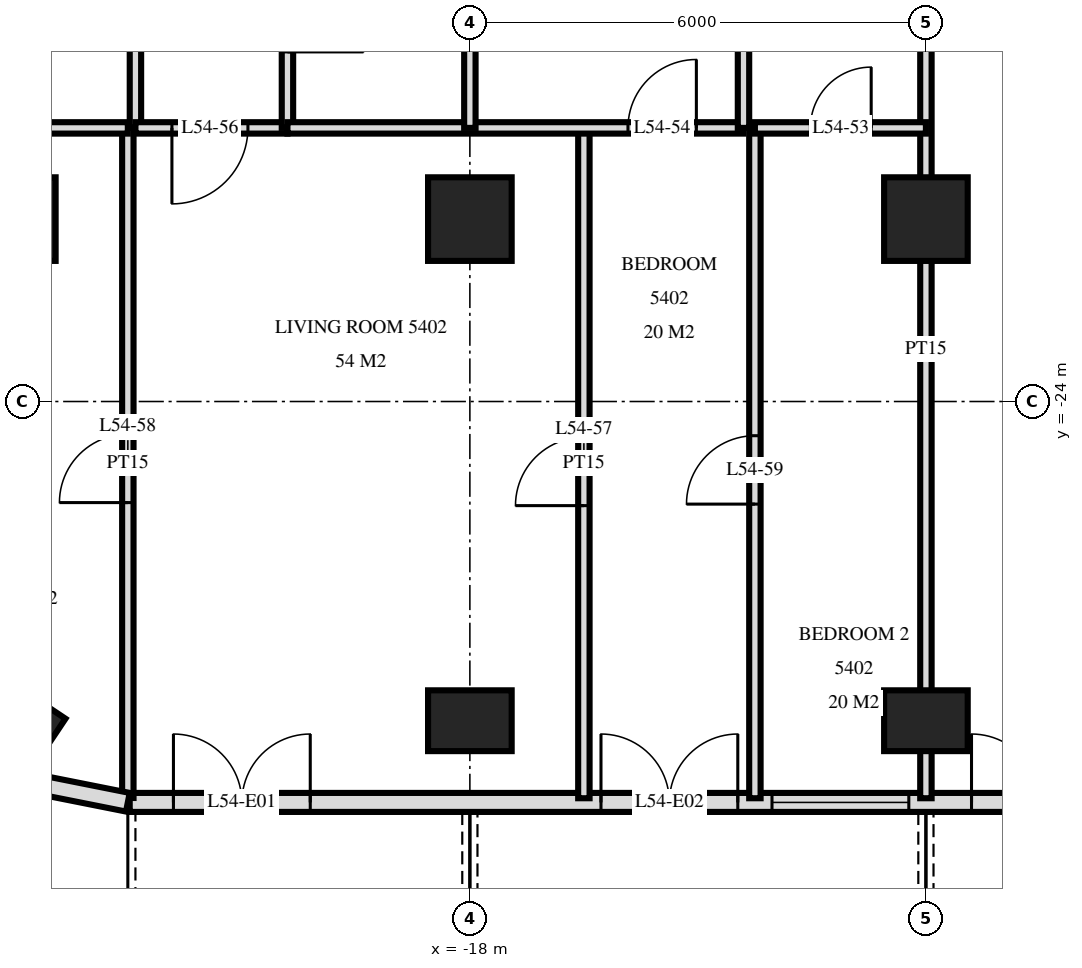
"""IFC4 building model, lengths in metres.
Left out: names, types, materials, properties, quantities, classifications, styles, units other than length and angle.
Written with IfcOpenShell. Run it as: python <this file> out.ifc"""

import sys

from ifc_helpers import new_model, si_unit, direction, frame, frame_2d, origin, origin_2d, place, context, subcontext, project, spatial, rectangle, extrude, element, fill, save


model = new_model("IFC4")
c1 = context("Model", 3, precision=1e-05, world=origin(), true_north=direction((0.0, 1.0)))
c2 = subcontext(c1, "Body", "Model", "MODEL_VIEW")
j1 = project(units=[si_unit("LENGTHUNIT", "METRE"), si_unit("PLANEANGLEUNIT", "RADIAN")], contexts=[c1])
p1 = place(None, origin())
s1 = spatial("IfcSite", under=j1, at=p1, CompositionType="ELEMENT")
p2 = place(p1, origin())
s2 = spatial("IfcBuilding", under=s1, at=p2, CompositionType="ELEMENT")
p3 = place(p2, frame((0.0, 0.0, 208.1)))
s3 = spatial("IfcBuildingStorey", under=s2, at=p3, CompositionType="ELEMENT", Elevation=208.1)
p4 = place(p3, frame((-24.0, -28.2, 0.0), z_axis=(0.0, 0.0, 1.0), x_axis=(-0.831459915646, 0.555584744817, 0.0)))
e1 = element("IfcColumn", 1, at=p4, inside=s3, PredefinedType="COLUMN", context=c2, shape_type="SweptSolid", body=[
    extrude(rectangle(XDim=1.1, YDim=0.8, at=origin_2d()), origin(), (0.0, 0.0, 1.0), 3.5),
])
p5 = place(p3, frame((-24.0, -21.6, 0.0), z_axis=(0.0, 0.0, 1.0), x_axis=(1.0, 0.0, 0.0)))
e2 = element("IfcColumn", 2, at=p5, inside=s3, PredefinedType="COLUMN", context=c2, shape_type="SweptSolid", body=[
    extrude(rectangle(XDim=1.1, YDim=1.1, at=origin_2d()), origin(), (0.0, 0.0, 1.0), 3.5),
])
p6 = place(p3, frame((-18.0, -28.2, 0.0), z_axis=(0.0, 0.0, 1.0), x_axis=(1.0, 0.0, 0.0)))
e3 = element("IfcColumn", 3, at=p6, inside=s3, PredefinedType="COLUMN", context=c2, shape_type="SweptSolid", body=[
    extrude(rectangle(XDim=1.1, YDim=0.8, at=origin_2d()), origin(), (0.0, 0.0, 1.0), 3.5),
])
p7 = place(p3, frame((-18.0, -21.6, 0.0), z_axis=(0.0, 0.0, 1.0), x_axis=(1.0, 0.0, 0.0)))
e4 = element("IfcColumn", 4, at=p7, inside=s3, PredefinedType="COLUMN", context=c2, shape_type="SweptSolid", body=[
    extrude(rectangle(XDim=1.1, YDim=1.1, at=origin_2d()), origin(), (0.0, 0.0, 1.0), 3.5),
])
p8 = place(p3, frame((-12.0, -28.2, 0.0), z_axis=(0.0, 0.0, 1.0), x_axis=(1.0, 0.0, 0.0)))
e5 = element("IfcColumn", 5, at=p8, inside=s3, PredefinedType="COLUMN", context=c2, shape_type="SweptSolid", body=[
    extrude(rectangle(XDim=1.1, YDim=0.8, at=origin_2d()), origin(), (0.0, 0.0, 1.0), 3.5),
])
p9 = place(p3, frame((-12.0, -21.6, 0.0), z_axis=(0.0, 0.0, 1.0), x_axis=(1.0, 0.0, 0.0)))
e6 = element("IfcColumn", 6, at=p9, inside=s3, PredefinedType="COLUMN", context=c2, shape_type="SweptSolid", body=[
    extrude(rectangle(XDim=1.1, YDim=1.1, at=origin_2d()), origin(), (0.0, 0.0, 1.0), 3.5),
])
p10 = place(p3, frame((-24.149, -28.945, 0.0), z_axis=(0.0, 0.0, 1.0), x_axis=(0.980775640221, -0.19513878023, 0.0)))
e7 = element("IfcWall", 7, at=p10, inside=s3, PredefinedType="SOLIDWALL", context=c2, shape_type="SweptSolid", body=[
    extrude(rectangle(XDim=1.681, YDim=0.25, at=frame_2d((0.841, 0.0))), origin(), (0.0, 0.0, 1.0), 3.22),
])
p11 = place(p3, frame((-22.475, -29.275, 0.0), z_axis=(0.0, 0.0, 1.0), x_axis=(1.0, 0.0, 0.0)))
e8 = element("IfcWall", 8, at=p11, inside=s3, PredefinedType="SOLIDWALL", context=c2, shape_type="SweptSolid", body=[
    extrude(rectangle(XDim=44.951, YDim=0.25, at=frame_2d((22.475, 0.0))), origin(), (0.0, 0.0, 1.0), 3.22),
])
p12 = place(p11, frame((0.575, 0.0, 0.0)))
e9 = element("IfcOpeningElement", 9, at=p12, cuts=e8, PredefinedType="OPENING", context=c2, shape_type="SweptSolid", body=[
    extrude(rectangle(XDim=1.8, YDim=2.4, at=frame_2d((0.9, 1.2))), frame((0.0, 0.135, 0.0), z_axis=(0.0, -1.0, 0.0), x_axis=(1.0, 0.0, 0.0)), (0.0, 0.0, 1.0), 0.27),
])
p13 = place(p11, frame((6.2, 0.0, 0.0)))
e10 = element("IfcOpeningElement", 10, at=p13, cuts=e8, PredefinedType="OPENING", context=c2, shape_type="SweptSolid", body=[
    extrude(rectangle(XDim=1.8, YDim=2.4, at=frame_2d((0.9, 1.2))), frame((0.0, 0.135, 0.0), z_axis=(0.0, -1.0, 0.0), x_axis=(1.0, 0.0, 0.0)), (0.0, 0.0, 1.0), 0.27),
])
p14 = place(p11, frame((8.45, 0.0, 0.9)))
e11 = element("IfcOpeningElement", 11, at=p14, cuts=e8, PredefinedType="OPENING", context=c2, shape_type="SweptSolid", body=[
    extrude(rectangle(XDim=1.8, YDim=1.5, at=frame_2d((0.9, 0.75))), frame((0.0, 0.135, 0.0), z_axis=(0.0, -1.0, 0.0), x_axis=(1.0, 0.0, 0.0)), (0.0, 0.0, 1.0), 0.27),
])
p15 = place(p11, frame((11.075, 0.0, 0.0)))
e12 = element("IfcOpeningElement", 12, at=p15, cuts=e8, PredefinedType="OPENING", context=c2, shape_type="SweptSolid", body=[
    extrude(rectangle(XDim=1.8, YDim=2.4, at=frame_2d((0.9, 1.2))), frame((0.0, 0.135, 0.0), z_axis=(0.0, -1.0, 0.0), x_axis=(1.0, 0.0, 0.0)), (0.0, 0.0, 1.0), 0.27),
])
p16 = place(p11, frame((13.775, 0.0, 0.9)))
e13 = element("IfcOpeningElement", 13, at=p16, cuts=e8, PredefinedType="OPENING", context=c2, shape_type="SweptSolid", body=[
    extrude(rectangle(XDim=2.4, YDim=1.5, at=frame_2d((1.2, 0.75))), frame((0.0, 0.135, 0.0), z_axis=(0.0, -1.0, 0.0), x_axis=(1.0, 0.0, 0.0)), (0.0, 0.0, 1.0), 0.27),
])
p17 = place(p11, frame((16.775, 0.0, 0.9)))
e14 = element("IfcOpeningElement", 14, at=p17, cuts=e8, PredefinedType="OPENING", context=c2, shape_type="SweptSolid", body=[
    extrude(rectangle(XDim=2.4, YDim=1.5, at=frame_2d((1.2, 0.75))), frame((0.0, 0.135, 0.0), z_axis=(0.0, -1.0, 0.0), x_axis=(1.0, 0.0, 0.0)), (0.0, 0.0, 1.0), 0.27),
])
p18 = place(p11, frame((20.075, 0.0, 0.0)))
e15 = element("IfcOpeningElement", 15, at=p18, cuts=e8, PredefinedType="OPENING", context=c2, shape_type="SweptSolid", body=[
    extrude(rectangle(XDim=1.8, YDim=2.4, at=frame_2d((0.9, 1.2))), frame((0.0, 0.135, 0.0), z_axis=(0.0, -1.0, 0.0), x_axis=(1.0, 0.0, 0.0)), (0.0, 0.0, 1.0), 0.27),
])
p19 = place(p11, frame((23.075, 0.0, 0.0)))
e16 = element("IfcOpeningElement", 16, at=p19, cuts=e8, PredefinedType="OPENING", context=c2, shape_type="SweptSolid", body=[
    extrude(rectangle(XDim=1.8, YDim=2.4, at=frame_2d((0.9, 1.2))), frame((0.0, 0.135, 0.0), z_axis=(0.0, -1.0, 0.0), x_axis=(1.0, 0.0, 0.0)), (0.0, 0.0, 1.0), 0.27),
])
p20 = place(p11, frame((25.775, 0.0, 0.9)))
e17 = element("IfcOpeningElement", 17, at=p20, cuts=e8, PredefinedType="OPENING", context=c2, shape_type="SweptSolid", body=[
    extrude(rectangle(XDim=2.4, YDim=1.5, at=frame_2d((1.2, 0.75))), frame((0.0, 0.135, 0.0), z_axis=(0.0, -1.0, 0.0), x_axis=(1.0, 0.0, 0.0)), (0.0, 0.0, 1.0), 0.27),
])
p21 = place(p11, frame((29.075, 0.0, 0.0)))
e18 = element("IfcOpeningElement", 18, at=p21, cuts=e8, PredefinedType="OPENING", context=c2, shape_type="SweptSolid", body=[
    extrude(rectangle(XDim=1.8, YDim=2.4, at=frame_2d((0.9, 1.2))), frame((0.0, 0.135, 0.0), z_axis=(0.0, -1.0, 0.0), x_axis=(1.0, 0.0, 0.0)), (0.0, 0.0, 1.0), 0.27),
])
p22 = place(p11, frame((31.775, 0.0, 0.9)))
e19 = element("IfcOpeningElement", 19, at=p22, cuts=e8, PredefinedType="OPENING", context=c2, shape_type="SweptSolid", body=[
    extrude(rectangle(XDim=2.4, YDim=1.5, at=frame_2d((1.2, 0.75))), frame((0.0, 0.135, 0.0), z_axis=(0.0, -1.0, 0.0), x_axis=(1.0, 0.0, 0.0)), (0.0, 0.0, 1.0), 0.27),
])
p23 = place(p11, frame((34.775, 0.0, 0.9)))
e20 = element("IfcOpeningElement", 20, at=p23, cuts=e8, PredefinedType="OPENING", context=c2, shape_type="SweptSolid", body=[
    extrude(rectangle(XDim=2.4, YDim=1.5, at=frame_2d((1.2, 0.75))), frame((0.0, 0.135, 0.0), z_axis=(0.0, -1.0, 0.0), x_axis=(1.0, 0.0, 0.0)), (0.0, 0.0, 1.0), 0.27),
])
p24 = place(p11, frame((38.075, 0.0, 0.0)))
e21 = element("IfcOpeningElement", 21, at=p24, cuts=e8, PredefinedType="OPENING", context=c2, shape_type="SweptSolid", body=[
    extrude(rectangle(XDim=1.8, YDim=2.4, at=frame_2d((0.9, 1.2))), frame((0.0, 0.135, 0.0), z_axis=(0.0, -1.0, 0.0), x_axis=(1.0, 0.0, 0.0)), (0.0, 0.0, 1.0), 0.27),
])
p25 = place(p11, frame((41.075, 0.0, 0.0)))
e22 = element("IfcOpeningElement", 22, at=p25, cuts=e8, PredefinedType="OPENING", context=c2, shape_type="SweptSolid", body=[
    extrude(rectangle(XDim=1.8, YDim=2.4, at=frame_2d((0.9, 1.2))), frame((0.0, 0.135, 0.0), z_axis=(0.0, -1.0, 0.0), x_axis=(1.0, 0.0, 0.0)), (0.0, 0.0, 1.0), 0.27),
])
p26 = place(p3, frame((-12.0, -29.22, 0.0), z_axis=(0.0, 0.0, 1.0), x_axis=(0.0, 1.0, 0.0)))
e23 = element("IfcWall", 23, at=p26, inside=s3, PredefinedType="PARTITIONING", context=c2, shape_type="SweptSolid", body=[
    extrude(rectangle(XDim=11.82, YDim=0.15, at=frame_2d((5.91, 0.0))), origin(), (0.0, 0.0, 1.0), 3.22),
])
p27 = place(p3, frame((-14.25, -29.22, 0.0), z_axis=(0.0, 0.0, 1.0), x_axis=(0.0, 1.0, 0.0)))
e24 = element("IfcWall", 24, at=p27, inside=s3, PredefinedType="PARTITIONING", context=c2, shape_type="SweptSolid", body=[
    extrude(rectangle(XDim=8.82, YDim=0.15, at=frame_2d((4.41, 0.0))), origin(), (0.0, 0.0, 1.0), 3.22),
])
p28 = place(p27, frame((3.87, 0.0, 0.0)))
e25 = element("IfcOpeningElement", 25, at=p28, cuts=e24, PredefinedType="OPENING", context=c2, shape_type="SweptSolid", body=[
    extrude(rectangle(XDim=0.9, YDim=2.1, at=frame_2d((0.45, 1.05))), frame((0.0, 0.085, 0.0), z_axis=(0.0, -1.0, 0.0), x_axis=(1.0, 0.0, 0.0)), (0.0, 0.0, 1.0), 0.17),
])
p29 = place(p3, frame((-14.4, -20.4, 0.0), z_axis=(0.0, 0.0, 1.0), x_axis=(0.0, 1.0, 0.0)))
e26 = element("IfcWall", 26, at=p29, inside=s3, PredefinedType="PARTITIONING", context=c2, shape_type="SweptSolid", body=[
    extrude(rectangle(XDim=3.0, YDim=0.15, at=frame_2d((1.5, 0.0))), origin(), (0.0, 0.0, 1.0), 3.22),
])
p30 = place(p3, frame((-16.5, -29.22, 0.0), z_axis=(0.0, 0.0, 1.0), x_axis=(0.0, 1.0, 0.0)))
e27 = element("IfcWall", 27, at=p30, inside=s3, PredefinedType="PARTITIONING", context=c2, shape_type="SweptSolid", body=[
    extrude(rectangle(XDim=8.82, YDim=0.15, at=frame_2d((4.41, 0.0))), origin(), (0.0, 0.0, 1.0), 3.22),
])
p31 = place(p30, frame((3.85, 0.0, 0.0)))
e28 = element("IfcOpeningElement", 28, at=p31, cuts=e27, PredefinedType="OPENING", context=c2, shape_type="SweptSolid", body=[
    extrude(rectangle(XDim=0.9, YDim=2.1, at=frame_2d((0.45, 1.05))), frame((0.0, 0.085, 0.0), z_axis=(0.0, -1.0, 0.0), x_axis=(1.0, 0.0, 0.0)), (0.0, 0.0, 1.0), 0.17),
])
p32 = place(p3, frame((-18.0, -20.4, 0.0), z_axis=(0.0, 0.0, 1.0), x_axis=(0.0, 1.0, 0.0)))
e29 = element("IfcWall", 29, at=p32, inside=s3, PredefinedType="PARTITIONING", context=c2, shape_type="SweptSolid", body=[
    extrude(rectangle(XDim=3.0, YDim=0.15, at=frame_2d((1.5, 0.0))), origin(), (0.0, 0.0, 1.0), 3.22),
])
p33 = place(p3, frame((-20.4, -20.4, 0.0), z_axis=(0.0, 0.0, 1.0), x_axis=(0.0, 1.0, 0.0)))
e30 = element("IfcWall", 30, at=p33, inside=s3, PredefinedType="PARTITIONING", context=c2, shape_type="SweptSolid", body=[
    extrude(rectangle(XDim=3.0, YDim=0.15, at=frame_2d((1.5, 0.0))), origin(), (0.0, 0.0, 1.0), 3.22),
])
p34 = place(p33, frame((1.0, 0.0, 0.0)))
e31 = element("IfcOpeningElement", 31, at=p34, cuts=e30, PredefinedType="OPENING", context=c2, shape_type="SweptSolid", body=[
    extrude(rectangle(XDim=1.0, YDim=2.1, at=frame_2d((0.5, 1.05))), frame((0.0, 0.085, 0.0), z_axis=(0.0, -1.0, 0.0), x_axis=(1.0, 0.0, 0.0)), (0.0, 0.0, 1.0), 0.17),
])
p35 = place(p3, frame((-22.4, -20.4, 0.0), z_axis=(0.0, 0.0, 1.0), x_axis=(0.0, 1.0, 0.0)))
e32 = element("IfcWall", 32, at=p35, inside=s3, PredefinedType="PARTITIONING", context=c2, shape_type="SweptSolid", body=[
    extrude(rectangle(XDim=3.0, YDim=0.15, at=frame_2d((1.5, 0.0))), origin(), (0.0, 0.0, 1.0), 3.22),
])
p36 = place(p3, frame((-22.5, -29.217, 0.0), z_axis=(0.0, 0.0, 1.0), x_axis=(0.0, 1.0, 0.0)))
e33 = element("IfcWall", 33, at=p36, inside=s3, PredefinedType="PARTITIONING", context=c2, shape_type="SweptSolid", body=[
    extrude(rectangle(XDim=8.817, YDim=0.15, at=frame_2d((4.408, 0.0))), origin(), (0.0, 0.0, 1.0), 3.22),
])
p37 = place(p36, frame((3.886, 0.0, 0.0)))
e34 = element("IfcOpeningElement", 34, at=p37, cuts=e33, PredefinedType="OPENING", context=c2, shape_type="SweptSolid", body=[
    extrude(rectangle(XDim=0.9, YDim=2.1, at=frame_2d((0.45, 1.05))), frame((0.0, 0.085, 0.0), z_axis=(0.0, -1.0, 0.0), x_axis=(1.0, 0.0, 0.0)), (0.0, 0.0, 1.0), 0.17),
])
p38 = place(p3, frame((-22.4, -20.4, 0.0), z_axis=(0.0, 0.0, 1.0), x_axis=(1.0, 0.0, 0.0)))
e35 = element("IfcWall", 35, at=p38, inside=s3, PredefinedType="PARTITIONING", context=c2, shape_type="SweptSolid", body=[
    extrude(rectangle(XDim=2.0, YDim=0.15, at=frame_2d((1.0, 0.0))), origin(), (0.0, 0.0, 1.0), 3.22),
])
p39 = place(p38, frame((0.48, 0.0, 0.0)))
e36 = element("IfcOpeningElement", 36, at=p39, cuts=e35, PredefinedType="OPENING", context=c2, shape_type="SweptSolid", body=[
    extrude(rectangle(XDim=1.0, YDim=2.1, at=frame_2d((0.5, 1.05))), frame((0.0, 0.085, 0.0), z_axis=(0.0, -1.0, 0.0), x_axis=(1.0, 0.0, 0.0)), (0.0, 0.0, 1.0), 0.17),
])
p40 = place(p3, frame((-26.82, -20.4, 0.0), z_axis=(0.0, 0.0, 1.0), x_axis=(1.0, 0.0, 0.0)))
e37 = element("IfcWall", 37, at=p40, inside=s3, PredefinedType="PARTITIONING", context=c2, shape_type="SweptSolid", body=[
    extrude(rectangle(XDim=4.32, YDim=0.15, at=frame_2d((2.16, 0.0))), origin(), (0.0, 0.0, 1.0), 3.22),
])
p41 = place(p3, frame((-20.4, -20.4, 0.0), z_axis=(0.0, 0.0, 1.0), x_axis=(1.0, 0.0, 0.0)))
e38 = element("IfcWall", 38, at=p41, inside=s3, PredefinedType="PARTITIONING", context=c2, shape_type="SweptSolid", body=[
    extrude(rectangle(XDim=6.0, YDim=0.15, at=frame_2d((3.0, 0.0))), origin(), (0.0, 0.0, 1.0), 3.22),
])
p42 = place(p41, frame((4.48, 0.0, 0.0)))
e39 = element("IfcOpeningElement", 39, at=p42, cuts=e38, PredefinedType="OPENING", context=c2, shape_type="SweptSolid", body=[
    extrude(rectangle(XDim=0.9, YDim=2.1, at=frame_2d((0.45, 1.05))), frame((0.0, 0.085, 0.0), z_axis=(0.0, -1.0, 0.0), x_axis=(1.0, 0.0, 0.0)), (0.0, 0.0, 1.0), 0.17),
])
p43 = place(p3, frame((-14.25, -20.4, 0.0), z_axis=(0.0, 0.0, 1.0), x_axis=(1.0, 0.0, 0.0)))
e40 = element("IfcWall", 40, at=p43, inside=s3, PredefinedType="PARTITIONING", context=c2, shape_type="SweptSolid", body=[
    extrude(rectangle(XDim=2.25, YDim=0.15, at=frame_2d((1.125, 0.0))), origin(), (0.0, 0.0, 1.0), 3.22),
])
p44 = place(p43, frame((0.73, 0.0, 0.0)))
e41 = element("IfcOpeningElement", 41, at=p44, cuts=e40, PredefinedType="OPENING", context=c2, shape_type="SweptSolid", body=[
    extrude(rectangle(XDim=0.8, YDim=2.1, at=frame_2d((0.4, 1.05))), frame((0.0, 0.085, 0.0), z_axis=(0.0, -1.0, 0.0), x_axis=(1.0, 0.0, 0.0)), (0.0, 0.0, 1.0), 0.17),
])
p45 = place(p12, origin())
e42 = element("IfcDoor", 42, at=p45, inside=s3, OperationType="DOUBLE_DOOR_SINGLE_SWING", PredefinedType="DOOR", context=c2, shape_type="SweptSolid", body=[
    extrude(rectangle(XDim=1.8, YDim=2.4, at=frame_2d((0.9, 1.2))), frame((0.0, 0.025, 0.0), z_axis=(0.0, -1.0, 0.0), x_axis=(1.0, 0.0, 0.0)), (0.0, 0.0, 1.0), 0.05),
])
fill(e9, e42)
p46 = place(p13, origin())
e43 = element("IfcDoor", 43, at=p46, inside=s3, OperationType="DOUBLE_DOOR_SINGLE_SWING", PredefinedType="DOOR", context=c2, shape_type="SweptSolid", body=[
    extrude(rectangle(XDim=1.8, YDim=2.4, at=frame_2d((0.9, 1.2))), frame((0.0, 0.025, 0.0), z_axis=(0.0, -1.0, 0.0), x_axis=(1.0, 0.0, 0.0)), (0.0, 0.0, 1.0), 0.05),
])
fill(e10, e43)
p47 = place(p14, origin())
e44 = element("IfcWindow", 44, at=p47, inside=s3, PartitioningType="SINGLE_PANEL", PredefinedType="WINDOW", context=c2, shape_type="SweptSolid", body=[
    extrude(rectangle(XDim=1.8, YDim=1.5, at=frame_2d((0.9, 0.75))), frame((0.0, 0.03, 0.0), z_axis=(0.0, -1.0, 0.0), x_axis=(1.0, 0.0, 0.0)), (0.0, 0.0, 1.0), 0.06),
])
fill(e11, e44)
p48 = place(p15, origin())
e45 = element("IfcDoor", 45, at=p48, inside=s3, OperationType="DOUBLE_DOOR_SINGLE_SWING", PredefinedType="DOOR", context=c2, shape_type="SweptSolid", body=[
    extrude(rectangle(XDim=1.8, YDim=2.4, at=frame_2d((0.9, 1.2))), frame((0.0, 0.025, 0.0), z_axis=(0.0, -1.0, 0.0), x_axis=(1.0, 0.0, 0.0)), (0.0, 0.0, 1.0), 0.05),
])
fill(e12, e45)
p49 = place(p44, origin())
e46 = element("IfcDoor", 46, at=p49, inside=s3, OperationType="SINGLE_SWING_LEFT", PredefinedType="DOOR", context=c2, shape_type="SweptSolid", body=[
    extrude(rectangle(XDim=0.8, YDim=2.1, at=frame_2d((0.4, 1.05))), frame((0.0, 0.025, 0.0), z_axis=(0.0, -1.0, 0.0), x_axis=(1.0, 0.0, 0.0)), (0.0, 0.0, 1.0), 0.05),
])
fill(e41, e46)
p50 = place(p42, origin())
e47 = element("IfcDoor", 47, at=p50, inside=s3, OperationType="SINGLE_SWING_LEFT", PredefinedType="DOOR", context=c2, shape_type="SweptSolid", body=[
    extrude(rectangle(XDim=0.9, YDim=2.1, at=frame_2d((0.45, 1.05))), frame((0.0, 0.025, 0.0), z_axis=(0.0, -1.0, 0.0), x_axis=(1.0, 0.0, 0.0)), (0.0, 0.0, 1.0), 0.05),
])
fill(e39, e47)
p51 = place(p39, frame((0.5, 0.0, 0.0), z_axis=(0.0, 0.0, 1.0), x_axis=(-1.0, 0.0, 0.0)))
e48 = element("IfcDoor", 48, at=p51, inside=s3, OperationType="SINGLE_SWING_LEFT", PredefinedType="DOOR", context=c2, shape_type="SweptSolid", body=[
    extrude(rectangle(XDim=1.0, YDim=2.1, at=frame_2d((0.0, 1.05))), frame((0.0, -0.025, 0.0), z_axis=(0.0, 1.0, 0.0), x_axis=(-1.0, 0.0, 0.0)), (0.0, 0.0, 1.0), 0.05),
])
fill(e36, e48)
p52 = place(p31, origin())
e49 = element("IfcDoor", 49, at=p52, inside=s3, OperationType="SINGLE_SWING_RIGHT", PredefinedType="DOOR", context=c2, shape_type="SweptSolid", body=[
    extrude(rectangle(XDim=0.9, YDim=2.1, at=frame_2d((0.45, 1.05))), frame((0.0, 0.025, 0.0), z_axis=(0.0, -1.0, 0.0), x_axis=(1.0, 0.0, 0.0)), (0.0, 0.0, 1.0), 0.05),
])
fill(e28, e49)
p53 = place(p37, origin())
e50 = element("IfcDoor", 50, at=p53, inside=s3, OperationType="SINGLE_SWING_RIGHT", PredefinedType="DOOR", context=c2, shape_type="SweptSolid", body=[
    extrude(rectangle(XDim=0.9, YDim=2.1, at=frame_2d((0.45, 1.05))), frame((0.0, 0.025, 0.0), z_axis=(0.0, -1.0, 0.0), x_axis=(1.0, 0.0, 0.0)), (0.0, 0.0, 1.0), 0.05),
])
fill(e34, e50)
p54 = place(p28, origin())
e51 = element("IfcDoor", 51, at=p54, inside=s3, OperationType="SINGLE_SWING_RIGHT", PredefinedType="DOOR", context=c2, shape_type="SweptSolid", body=[
    extrude(rectangle(XDim=0.9, YDim=2.1, at=frame_2d((0.45, 1.05))), frame((0.0, 0.025, 0.0), z_axis=(0.0, -1.0, 0.0), x_axis=(1.0, 0.0, 0.0)), (0.0, 0.0, 1.0), 0.05),
])
fill(e25, e51)
save(model, sys.argv[1])
